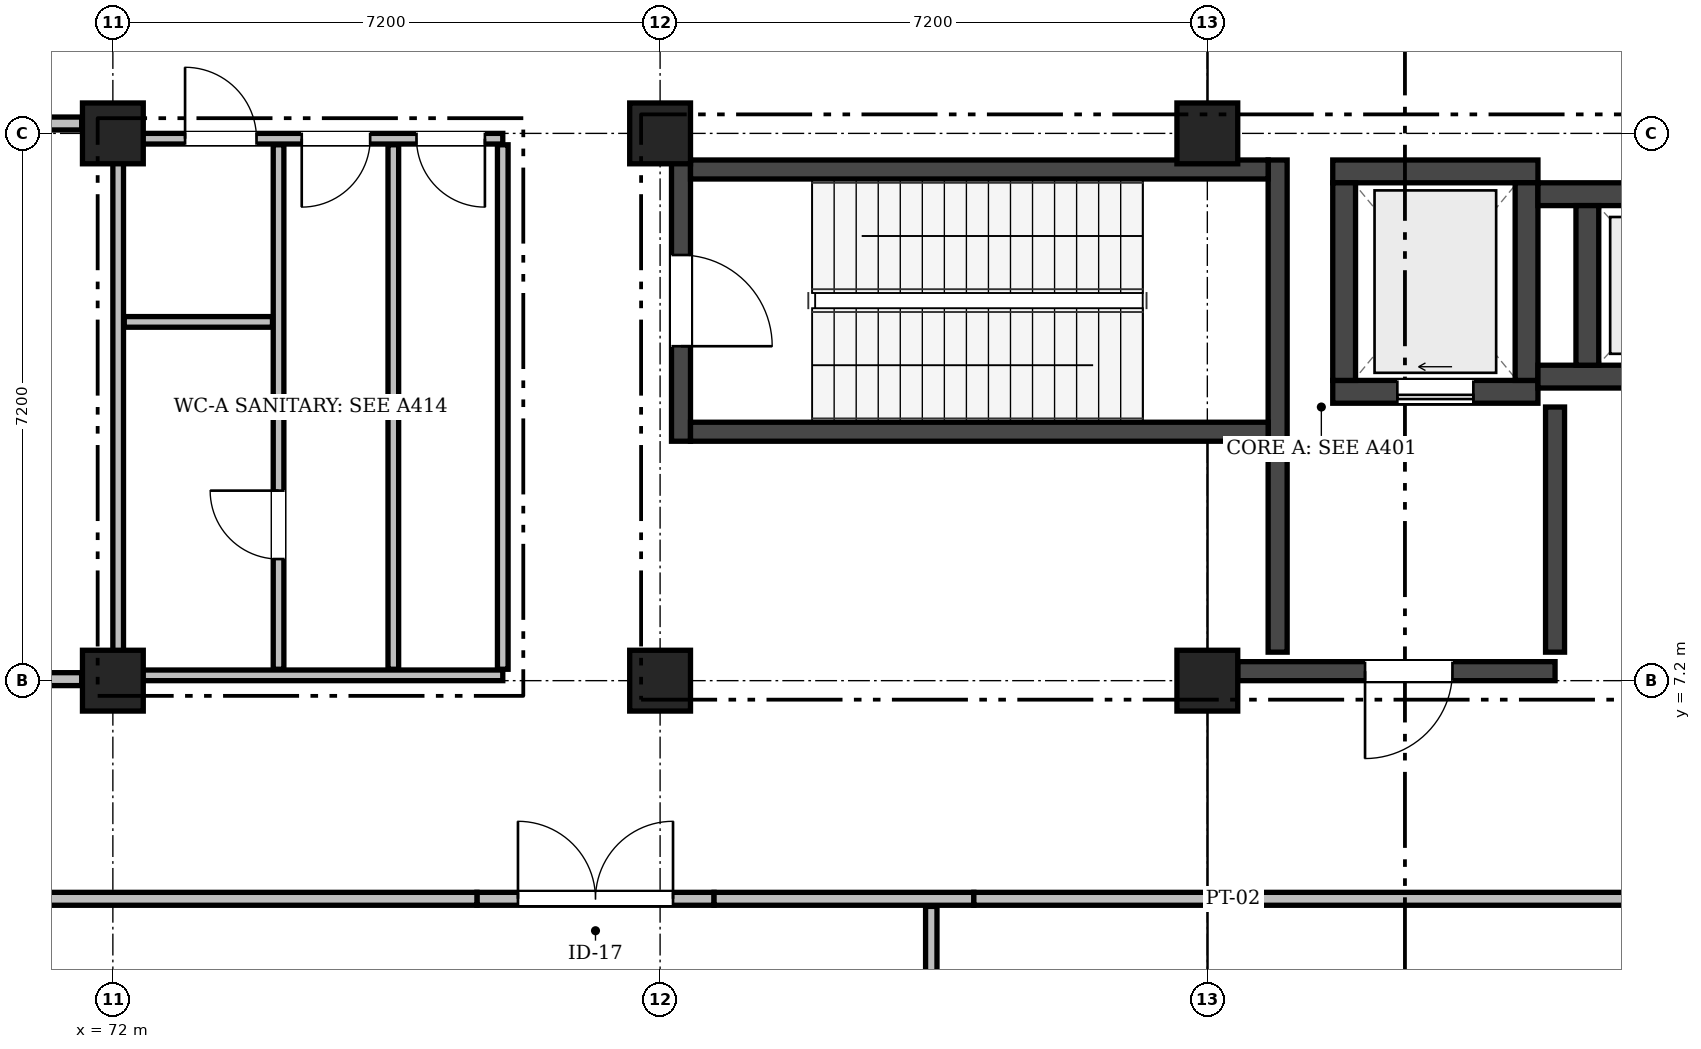
"""IFC4 building model, lengths in metres.
Left out: names, types, materials, properties, quantities, classifications, styles, units other than length and angle.
Written with IfcOpenShell. Run it as: python <this file> out.ifc"""

import sys

from ifc_helpers import new_model, si_unit, direction, frame, frame_2d, origin, origin_2d, place, context, subcontext, project, spatial, rectangle, extrude, element, fill, save


model = new_model("IFC4")
c1 = context("Model", 3, precision=1e-05, world=origin(), true_north=direction((0.0, 1.0)))
c2 = subcontext(c1, "Body", "Model", "MODEL_VIEW")
j1 = project(units=[si_unit("LENGTHUNIT", "METRE"), si_unit("PLANEANGLEUNIT", "RADIAN")], contexts=[c1])
p1 = place(None, origin())
s1 = spatial("IfcSite", under=j1, at=p1, CompositionType="ELEMENT")
p2 = place(p1, origin())
s2 = spatial("IfcBuilding", under=s1, at=p2, CompositionType="ELEMENT")
p3 = place(p2, frame((0.0, 0.0, 9.6)))
s3 = spatial("IfcBuildingStorey", under=s2, at=p3, CompositionType="ELEMENT", Elevation=9.6)
for number, where, z_axis, x_axis in (
    (1, (72.0, 7.2, 0.0), (0.0, 0.0, 1.0), (1.0, 0.0, 0.0)),
    (2, (72.0, 14.4, 0.0), (0.0, 0.0, 1.0), (1.0, 0.0, 0.0)),
    (3, (79.2, 7.2, 0.0), (0.0, 0.0, 1.0), (1.0, 0.0, 0.0)),
    (4, (79.2, 14.4, 0.0), (0.0, 0.0, 1.0), (1.0, 0.0, 0.0)),
    (5, (86.4, 7.2, 0.0), (0.0, 0.0, 1.0), (1.0, 0.0, 0.0)),
    (6, (86.4, 14.4, 0.0), (0.0, 0.0, 1.0), (1.0, 0.0, 0.0)),
):
    element("IfcColumn", number, at=place(p3, frame(where, z_axis=z_axis, x_axis=x_axis)), inside=s3, PredefinedType="COLUMN", context=c2, shape_type="SweptSolid", body=[
        extrude(rectangle(XDim=0.8, YDim=0.8, at=origin_2d()), origin(), (0.0, 0.0, 1.0), 4.8),
    ])
p4 = place(p3, frame((88.05, 11.0, 0.0), z_axis=(0.0, 0.0, 1.0), x_axis=(1.0, 0.0, 0.0)))
e7 = element("IfcWall", 7, at=p4, inside=s3, PredefinedType="SHEAR", context=c2, shape_type="SweptSolid", body=[
    extrude(rectangle(XDim=2.7, YDim=0.3, at=frame_2d((1.35, 0.0))), origin(), (0.0, 0.0, 1.0), 4.55),
])
p5 = place(p4, frame((0.85, 0.0, 0.0)))
e8 = element("IfcOpeningElement", 8, at=p5, cuts=e7, PredefinedType="OPENING", context=c2, shape_type="SweptSolid", body=[
    extrude(rectangle(XDim=1.0, YDim=2.1, at=frame_2d((0.5, 1.05))), frame((0.0, 0.162, 0.0), z_axis=(0.0, -1.0, 0.0), x_axis=(1.0, 0.0, 0.0)), (0.0, 0.0, 1.0), 0.324),
])
p6 = place(p3, frame((88.05, 13.9, 0.0), z_axis=(0.0, 0.0, 1.0), x_axis=(1.0, 0.0, 0.0)))
e9 = element("IfcWall", 9, at=p6, inside=s3, PredefinedType="SHEAR", context=c2, shape_type="SweptSolid", body=[
    extrude(rectangle(XDim=2.7, YDim=0.3, at=frame_2d((1.35, 0.0))), origin(), (0.0, 0.0, 1.0), 4.55),
])
for number, where, z_axis, x_axis in (
    (10, (88.2, 11.15, 0.0), (0.0, 0.0, 1.0), (0.0, 1.0, 0.0)),
    (11, (90.6, 11.15, 0.0), (0.0, 0.0, 1.0), (0.0, 1.0, 0.0)),
):
    element("IfcWall", number, at=place(p3, frame(where, z_axis=z_axis, x_axis=x_axis)), inside=s3, PredefinedType="SHEAR", context=c2, shape_type="SweptSolid", body=[
        extrude(rectangle(XDim=2.6, YDim=0.3, at=frame_2d((1.3, 0.0))), origin(), (0.0, 0.0, 1.0), 4.55),
    ])
p7 = place(p3, frame((90.75, 11.2, 0.0), z_axis=(0.0, 0.0, 1.0), x_axis=(1.0, 0.0, 0.0)))
e12 = element("IfcWall", 12, at=p7, inside=s3, PredefinedType="SHEAR", context=c2, shape_type="SweptSolid", body=[
    extrude(rectangle(XDim=3.0, YDim=0.3, at=frame_2d((1.5, 0.0))), origin(), (0.0, 0.0, 1.0), 4.55),
])
p8 = place(p7, frame((1.25, 0.0, 0.0)))
e13 = element("IfcOpeningElement", 13, at=p8, cuts=e12, PredefinedType="OPENING", context=c2, shape_type="SweptSolid", body=[
    extrude(rectangle(XDim=1.0, YDim=2.1, at=frame_2d((0.5, 1.05))), frame((0.0, 0.162, 0.0), z_axis=(0.0, -1.0, 0.0), x_axis=(1.0, 0.0, 0.0)), (0.0, 0.0, 1.0), 0.324),
])
p9 = place(p3, frame((90.75, 13.6, 0.0), z_axis=(0.0, 0.0, 1.0), x_axis=(1.0, 0.0, 0.0)))
e14 = element("IfcWall", 14, at=p9, inside=s3, PredefinedType="SHEAR", context=c2, shape_type="SweptSolid", body=[
    extrude(rectangle(XDim=3.0, YDim=0.3, at=frame_2d((1.5, 0.0))), origin(), (0.0, 0.0, 1.0), 4.55),
])
p10 = place(p3, frame((91.4, 11.35, 0.0), z_axis=(0.0, 0.0, 1.0), x_axis=(0.0, 1.0, 0.0)))
e15 = element("IfcWall", 15, at=p10, inside=s3, PredefinedType="SHEAR", context=c2, shape_type="SweptSolid", body=[
    extrude(rectangle(XDim=2.1, YDim=0.3, at=frame_2d((1.05, 0.0))), origin(), (0.0, 0.0, 1.0), 4.55),
])
p11 = place(p3, frame((79.475, 10.35, 0.0), z_axis=(0.0, 0.0, 1.0), x_axis=(0.0, 1.0, 0.0)))
e16 = element("IfcWall", 16, at=p11, inside=s3, PredefinedType="SHEAR", context=c2, shape_type="SweptSolid", body=[
    extrude(rectangle(XDim=3.7, YDim=0.25, at=frame_2d((1.85, 0.0))), origin(), (0.0, 0.0, 1.0), 4.55),
])
p12 = place(p11, frame((1.25, 0.0, 0.0)))
e17 = element("IfcOpeningElement", 17, at=p12, cuts=e16, PredefinedType="OPENING", context=c2, shape_type="SweptSolid", body=[
    extrude(rectangle(XDim=1.2, YDim=2.15, at=frame_2d((0.6, 1.075))), frame((0.0, 0.137, 0.0), z_axis=(0.0, -1.0, 0.0), x_axis=(1.0, 0.0, 0.0)), (0.0, 0.0, 1.0), 0.274),
])
p13 = place(p3, frame((87.325, 10.35, 0.0), z_axis=(0.0, 0.0, 1.0), x_axis=(0.0, 1.0, 0.0)))
e18 = element("IfcWall", 18, at=p13, inside=s3, PredefinedType="SHEAR", context=c2, shape_type="SweptSolid", body=[
    extrude(rectangle(XDim=3.7, YDim=0.25, at=frame_2d((1.85, 0.0))), origin(), (0.0, 0.0, 1.0), 4.55),
])
for number, where, z_axis, x_axis in (
    (19, (79.6, 10.475, 0.0), (0.0, 0.0, 1.0), (1.0, 0.0, 0.0)),
    (20, (79.6, 13.925, 0.0), (0.0, 0.0, 1.0), (1.0, 0.0, 0.0)),
):
    element("IfcWall", number, at=place(p3, frame(where, z_axis=z_axis, x_axis=x_axis)), inside=s3, PredefinedType="SHEAR", context=c2, shape_type="SweptSolid", body=[
        extrude(rectangle(XDim=7.6, YDim=0.25, at=frame_2d((3.8, 0.0))), origin(), (0.0, 0.0, 1.0), 4.55),
    ])
p14 = place(p3, frame((86.8, 7.325, 0.0), z_axis=(0.0, 0.0, 1.0), x_axis=(1.0, 0.0, 0.0)))
e21 = element("IfcWall", 21, at=p14, inside=s3, PredefinedType="SHEAR", context=c2, shape_type="SweptSolid", body=[
    extrude(rectangle(XDim=4.175, YDim=0.25, at=frame_2d((2.087, 0.0))), origin(), (0.0, 0.0, 1.0), 4.55),
])
p15 = place(p14, frame((1.675, 0.0, 0.0)))
e22 = element("IfcOpeningElement", 22, at=p15, cuts=e21, PredefinedType="OPENING", context=c2, shape_type="SweptSolid", body=[
    extrude(rectangle(XDim=1.15, YDim=2.15, at=frame_2d((0.575, 1.075))), frame((0.0, 0.137, 0.0), z_axis=(0.0, -1.0, 0.0), x_axis=(1.0, 0.0, 0.0)), (0.0, 0.0, 1.0), 0.274),
])
p16 = place(p3, frame((87.325, 7.575, 0.0), z_axis=(0.0, 0.0, 1.0), x_axis=(0.0, 1.0, 0.0)))
e23 = element("IfcWall", 23, at=p16, inside=s3, PredefinedType="SHEAR", context=c2, shape_type="SweptSolid", body=[
    extrude(rectangle(XDim=2.77, YDim=0.25, at=frame_2d((1.385, 0.0))), origin(), (0.0, 0.0, 1.0), 4.55),
])
p17 = place(p3, frame((90.975, 7.575, 0.0), z_axis=(0.0, 0.0, 1.0), x_axis=(0.0, 1.0, 0.0)))
e24 = element("IfcWall", 24, at=p17, inside=s3, PredefinedType="SHEAR", context=c2, shape_type="SweptSolid", body=[
    extrude(rectangle(XDim=3.225, YDim=0.25, at=frame_2d((1.613, 0.0))), origin(), (0.0, 0.0, 1.0), 4.55),
])
p18 = place(p3, frame((72.07, 7.27, 0.0), z_axis=(0.0, 0.0, 1.0), x_axis=(1.0, 0.0, 0.0)))
e25 = element("IfcWall", 25, at=p18, inside=s3, PredefinedType="PARTITIONING", context=c2, shape_type="SweptSolid", body=[
    extrude(rectangle(XDim=5.06, YDim=0.14, at=frame_2d((2.53, 0.0))), origin(), (0.0, 0.0, 1.0), 3.93),
])
p19 = place(p3, frame((72.07, 14.33, 0.0), z_axis=(0.0, 0.0, 1.0), x_axis=(1.0, 0.0, 0.0)))
e26 = element("IfcWall", 26, at=p19, inside=s3, PredefinedType="PARTITIONING", context=c2, shape_type="SweptSolid", body=[
    extrude(rectangle(XDim=5.06, YDim=0.14, at=frame_2d((2.53, 0.0))), origin(), (0.0, 0.0, 1.0), 3.93),
])
p20 = place(p19, frame((0.88, 0.0, 0.0)))
e27 = element("IfcOpeningElement", 27, at=p20, cuts=e26, PredefinedType="OPENING", context=c2, shape_type="SweptSolid", body=[
    extrude(rectangle(XDim=0.94, YDim=2.1, at=frame_2d((0.47, 1.05))), frame((0.0, 0.082, 0.0), z_axis=(0.0, -1.0, 0.0), x_axis=(1.0, 0.0, 0.0)), (0.0, 0.0, 1.0), 0.164),
])
p21 = place(p19, frame((2.415, 0.0, 0.0)))
e28 = element("IfcOpeningElement", 28, at=p21, cuts=e26, PredefinedType="OPENING", context=c2, shape_type="SweptSolid", body=[
    extrude(rectangle(XDim=0.9, YDim=2.08, at=frame_2d((0.45, 1.04))), frame((0.0, 0.082, 0.0), z_axis=(0.0, -1.0, 0.0), x_axis=(1.0, 0.0, 0.0)), (0.0, 0.0, 1.0), 0.164),
])
p22 = place(p19, frame((3.925, 0.0, 0.0)))
e29 = element("IfcOpeningElement", 29, at=p22, cuts=e26, PredefinedType="OPENING", context=c2, shape_type="SweptSolid", body=[
    extrude(rectangle(XDim=0.9, YDim=2.08, at=frame_2d((0.45, 1.04))), frame((0.0, 0.082, 0.0), z_axis=(0.0, -1.0, 0.0), x_axis=(1.0, 0.0, 0.0)), (0.0, 0.0, 1.0), 0.164),
])
p23 = place(p3, frame((72.07, 7.35, 0.0), z_axis=(0.0, 0.0, 1.0), x_axis=(0.0, 1.0, 0.0)))
e30 = element("IfcWall", 30, at=p23, inside=s3, PredefinedType="PARTITIONING", context=c2, shape_type="SweptSolid", body=[
    extrude(rectangle(XDim=6.9, YDim=0.14, at=frame_2d((3.45, 0.0))), origin(), (0.0, 0.0, 1.0), 4.03),
])
p24 = place(p3, frame((77.13, 7.35, 0.0), z_axis=(0.0, 0.0, 1.0), x_axis=(0.0, 1.0, 0.0)))
e31 = element("IfcWall", 31, at=p24, inside=s3, PredefinedType="PARTITIONING", context=c2, shape_type="SweptSolid", body=[
    extrude(rectangle(XDim=6.9, YDim=0.14, at=frame_2d((3.45, 0.0))), origin(), (0.0, 0.0, 1.0), 4.46),
])
p25 = place(p3, frame((74.18, 7.35, 0.0), z_axis=(0.0, 0.0, 1.0), x_axis=(0.0, 1.0, 0.0)))
e32 = element("IfcWall", 32, at=p25, inside=s3, PredefinedType="PARTITIONING", context=c2, shape_type="SweptSolid", body=[
    extrude(rectangle(XDim=6.9, YDim=0.14, at=frame_2d((3.45, 0.0))), origin(), (0.0, 0.0, 1.0), 4.46),
])
p26 = place(p25, frame((1.45, 0.0, 0.0)))
e33 = element("IfcOpeningElement", 33, at=p26, cuts=e32, PredefinedType="OPENING", context=c2, shape_type="SweptSolid", body=[
    extrude(rectangle(XDim=0.9, YDim=2.08, at=frame_2d((0.45, 1.04))), frame((0.0, 0.082, 0.0), z_axis=(0.0, -1.0, 0.0), x_axis=(1.0, 0.0, 0.0)), (0.0, 0.0, 1.0), 0.164),
])
p27 = place(p3, frame((75.69, 7.35, 0.0), z_axis=(0.0, 0.0, 1.0), x_axis=(0.0, 1.0, 0.0)))
e34 = element("IfcWall", 34, at=p27, inside=s3, PredefinedType="PARTITIONING", context=c2, shape_type="SweptSolid", body=[
    extrude(rectangle(XDim=6.9, YDim=0.14, at=frame_2d((3.45, 0.0))), origin(), (0.0, 0.0, 1.0), 4.46),
])
p28 = place(p3, frame((72.15, 11.92, 0.0), z_axis=(0.0, 0.0, 1.0), x_axis=(1.0, 0.0, 0.0)))
e35 = element("IfcWall", 35, at=p28, inside=s3, PredefinedType="PARTITIONING", context=c2, shape_type="SweptSolid", body=[
    extrude(rectangle(XDim=1.95, YDim=0.14, at=frame_2d((0.975, 0.0))), origin(), (0.0, 0.0, 1.0), 4.46),
])
p29 = place(p3, frame((59.612, 14.53, 0.0), z_axis=(0.0, 0.0, 1.0), x_axis=(1.0, 0.0, 0.0)))
e36 = element("IfcWall", 36, at=p29, inside=s3, PredefinedType="PARTITIONING", context=c2, shape_type="SweptSolid", body=[
    extrude(rectangle(XDim=11.978, YDim=0.17, at=frame_2d((5.989, 0.0))), origin(), (0.0, 0.0, 1.0), 3.63),
])
p30 = place(p29, frame((5.029, 0.0, 0.0)))
e37 = element("IfcOpeningElement", 37, at=p30, cuts=e36, PredefinedType="OPENING", context=c2, shape_type="SweptSolid", body=[
    extrude(rectangle(XDim=1.92, YDim=2.32, at=frame_2d((0.96, 1.16))), frame((0.0, 0.097, 0.0), z_axis=(0.0, -1.0, 0.0), x_axis=(1.0, 0.0, 0.0)), (0.0, 0.0, 1.0), 0.194),
])
p31 = place(p3, frame((76.79, 4.33, 0.0), z_axis=(0.0, 0.0, 1.0), x_axis=(1.0, 0.0, 0.0)))
e38 = element("IfcWall", 38, at=p31, inside=s3, PredefinedType="PARTITIONING", context=c2, shape_type="SweptSolid", body=[
    extrude(rectangle(XDim=3.12, YDim=0.17, at=frame_2d((1.56, 0.0))), origin(), (0.0, 0.0, 1.0), 4.46),
])
p32 = place(p31, frame((0.54, 0.0, 0.0)))
e39 = element("IfcOpeningElement", 39, at=p32, cuts=e38, PredefinedType="OPENING", context=c2, shape_type="SweptSolid", body=[
    extrude(rectangle(XDim=2.04, YDim=2.34, at=frame_2d((1.02, 1.17))), frame((0.0, 0.097, 0.0), z_axis=(0.0, -1.0, 0.0), x_axis=(1.0, 0.0, 0.0)), (0.0, 0.0, 1.0), 0.194),
])
p33 = place(p3, frame((79.91, 4.33, 0.0), z_axis=(0.0, 0.0, 1.0), x_axis=(1.0, 0.0, 0.0)))
e40 = element("IfcWall", 40, at=p33, inside=s3, PredefinedType="PARTITIONING", context=c2, shape_type="SweptSolid", body=[
    extrude(rectangle(XDim=3.418, YDim=0.17, at=frame_2d((1.709, 0.0))), origin(), (0.0, 0.0, 1.0), 4.46),
])
p34 = place(p3, frame((83.328, 4.33, 0.0), z_axis=(0.0, 0.0, 1.0), x_axis=(1.0, 0.0, 0.0)))
e41 = element("IfcWall", 41, at=p34, inside=s3, PredefinedType="PARTITIONING", context=c2, shape_type="SweptSolid", body=[
    extrude(rectangle(XDim=23.716, YDim=0.17, at=frame_2d((11.858, 0.0))), origin(), (0.0, 0.0, 1.0), 4.46),
])
p35 = place(p34, frame((10.778, 0.0, 0.0)))
e42 = element("IfcOpeningElement", 42, at=p35, cuts=e41, PredefinedType="OPENING", context=c2, shape_type="SweptSolid", body=[
    extrude(rectangle(XDim=2.16, YDim=2.35, at=frame_2d((1.08, 1.175))), frame((0.0, 0.097, 0.0), z_axis=(0.0, -1.0, 0.0), x_axis=(1.0, 0.0, 0.0)), (0.0, 0.0, 1.0), 0.194),
])
p36 = place(p3, frame((59.624, 4.33, 0.0), z_axis=(0.0, 0.0, 1.0), x_axis=(1.0, 0.0, 0.0)))
e43 = element("IfcWall", 43, at=p36, inside=s3, PredefinedType="PARTITIONING", context=c2, shape_type="SweptSolid", body=[
    extrude(rectangle(XDim=17.167, YDim=0.17, at=frame_2d((8.583, 0.0))), origin(), (0.0, 0.0, 1.0), 4.46),
])
p37 = place(p36, frame((7.873, 0.0, 0.0)))
e44 = element("IfcOpeningElement", 44, at=p37, cuts=e43, PredefinedType="OPENING", context=c2, shape_type="SweptSolid", body=[
    extrude(rectangle(XDim=1.42, YDim=2.24, at=frame_2d((0.71, 1.12))), frame((0.0, 0.097, 0.0), z_axis=(0.0, -1.0, 0.0), x_axis=(1.0, 0.0, 0.0)), (0.0, 0.0, 1.0), 0.194),
])
p38 = place(p3, frame((65.21, 7.22, 0.0), z_axis=(0.0, 0.0, 1.0), x_axis=(1.0, 0.0, 0.0)))
e45 = element("IfcWall", 45, at=p38, inside=s3, PredefinedType="PARTITIONING", context=c2, shape_type="SweptSolid", body=[
    extrude(rectangle(XDim=6.38, YDim=0.17, at=frame_2d((3.19, 0.0))), origin(), (0.0, 0.0, 1.0), 3.93),
])
p39 = place(p38, frame((2.45, 0.0, 0.0)))
e46 = element("IfcOpeningElement", 46, at=p39, cuts=e45, PredefinedType="OPENING", context=c2, shape_type="SweptSolid", body=[
    extrude(rectangle(XDim=1.48, YDim=2.26, at=frame_2d((0.74, 1.13))), frame((0.0, 0.097, 0.0), z_axis=(0.0, -1.0, 0.0), x_axis=(1.0, 0.0, 0.0)), (0.0, 0.0, 1.0), 0.194),
])
p40 = place(p3, frame((82.768, 0.122, 0.0), z_axis=(0.0, 0.0, 1.0), x_axis=(0.0, 1.0, 0.0)))
e47 = element("IfcWall", 47, at=p40, inside=s3, PredefinedType="PARTITIONING", context=c2, shape_type="SweptSolid", body=[
    extrude(rectangle(XDim=4.108, YDim=0.15, at=frame_2d((2.054, 0.0))), origin(), (0.0, 0.0, 1.0), 4.46),
])
p41 = place(p5, frame((1.0, 0.0, 0.0), z_axis=(0.0, 0.0, 1.0), x_axis=(-1.0, 0.0, 0.0)))
e48 = element("IfcDoor", 48, at=p41, inside=s3, OperationType="SLIDING_TO_LEFT", PredefinedType="DOOR", context=c2, shape_type="SweptSolid", body=[
    extrude(rectangle(XDim=1.0, YDim=2.1, at=frame_2d((0.5, 1.05))), frame((0.0, 0.025, 0.0), z_axis=(0.0, -1.0, 0.0), x_axis=(1.0, 0.0, 0.0)), (0.0, 0.0, 1.0), 0.05),
])
fill(e8, e48)
p42 = place(p12, frame((1.2, 0.0, 0.0), z_axis=(0.0, 0.0, 1.0), x_axis=(-1.0, 0.0, 0.0)))
e49 = element("IfcDoor", 49, at=p42, inside=s3, OperationType="SINGLE_SWING_RIGHT", PredefinedType="DOOR", context=c2, shape_type="SweptSolid", body=[
    extrude(rectangle(XDim=1.2, YDim=2.15, at=frame_2d((0.6, 1.075))), frame((0.0, 0.025, 0.0), z_axis=(0.0, -1.0, 0.0), x_axis=(1.0, 0.0, 0.0)), (0.0, 0.0, 1.0), 0.05),
])
fill(e17, e49)
p43 = place(p15, frame((1.15, 0.0, 0.0), z_axis=(0.0, 0.0, 1.0), x_axis=(-1.0, 0.0, 0.0)))
e50 = element("IfcDoor", 50, at=p43, inside=s3, OperationType="SINGLE_SWING_RIGHT", PredefinedType="DOOR", context=c2, shape_type="SweptSolid", body=[
    extrude(rectangle(XDim=1.15, YDim=2.15, at=frame_2d((0.575, 1.075))), frame((0.0, 0.025, 0.0), z_axis=(0.0, -1.0, 0.0), x_axis=(1.0, 0.0, 0.0)), (0.0, 0.0, 1.0), 0.05),
])
fill(e22, e50)
p44 = place(p20, origin())
e51 = element("IfcDoor", 51, at=p44, inside=s3, OperationType="SINGLE_SWING_LEFT", PredefinedType="DOOR", context=c2, shape_type="SweptSolid", body=[
    extrude(rectangle(XDim=0.94, YDim=2.1, at=frame_2d((0.47, 1.05))), frame((0.0, 0.025, 0.0), z_axis=(0.0, -1.0, 0.0), x_axis=(1.0, 0.0, 0.0)), (0.0, 0.0, 1.0), 0.05),
])
fill(e27, e51)
p45 = place(p21, frame((0.9, 0.0, 0.0), z_axis=(0.0, 0.0, 1.0), x_axis=(-1.0, 0.0, 0.0)))
e52 = element("IfcDoor", 52, at=p45, inside=s3, OperationType="SINGLE_SWING_RIGHT", PredefinedType="DOOR", context=c2, shape_type="SweptSolid", body=[
    extrude(rectangle(XDim=0.9, YDim=2.08, at=frame_2d((0.45, 1.04))), frame((0.0, 0.025, 0.0), z_axis=(0.0, -1.0, 0.0), x_axis=(1.0, 0.0, 0.0)), (0.0, 0.0, 1.0), 0.05),
])
fill(e28, e52)
p46 = place(p22, frame((0.9, 0.0, 0.0), z_axis=(0.0, 0.0, 1.0), x_axis=(-1.0, 0.0, 0.0)))
e53 = element("IfcDoor", 53, at=p46, inside=s3, OperationType="SINGLE_SWING_LEFT", PredefinedType="DOOR", context=c2, shape_type="SweptSolid", body=[
    extrude(rectangle(XDim=0.9, YDim=2.08, at=frame_2d((0.45, 1.04))), frame((0.0, 0.025, 0.0), z_axis=(0.0, -1.0, 0.0), x_axis=(1.0, 0.0, 0.0)), (0.0, 0.0, 1.0), 0.05),
])
fill(e29, e53)
p47 = place(p26, origin())
e54 = element("IfcDoor", 54, at=p47, inside=s3, OperationType="SINGLE_SWING_RIGHT", PredefinedType="DOOR", context=c2, shape_type="SweptSolid", body=[
    extrude(rectangle(XDim=0.9, YDim=2.08, at=frame_2d((0.45, 1.04))), frame((0.0, 0.025, 0.0), z_axis=(0.0, -1.0, 0.0), x_axis=(1.0, 0.0, 0.0)), (0.0, 0.0, 1.0), 0.05),
])
fill(e33, e54)
p48 = place(p32, origin())
e55 = element("IfcDoor", 55, at=p48, inside=s3, OperationType="DOUBLE_DOOR_SINGLE_SWING", PredefinedType="DOOR", context=c2, shape_type="SweptSolid", body=[
    extrude(rectangle(XDim=2.04, YDim=2.34, at=frame_2d((1.02, 1.17))), frame((0.0, 0.025, 0.0), z_axis=(0.0, -1.0, 0.0), x_axis=(1.0, 0.0, 0.0)), (0.0, 0.0, 1.0), 0.05),
])
fill(e39, e55)
save(model, sys.argv[1])
